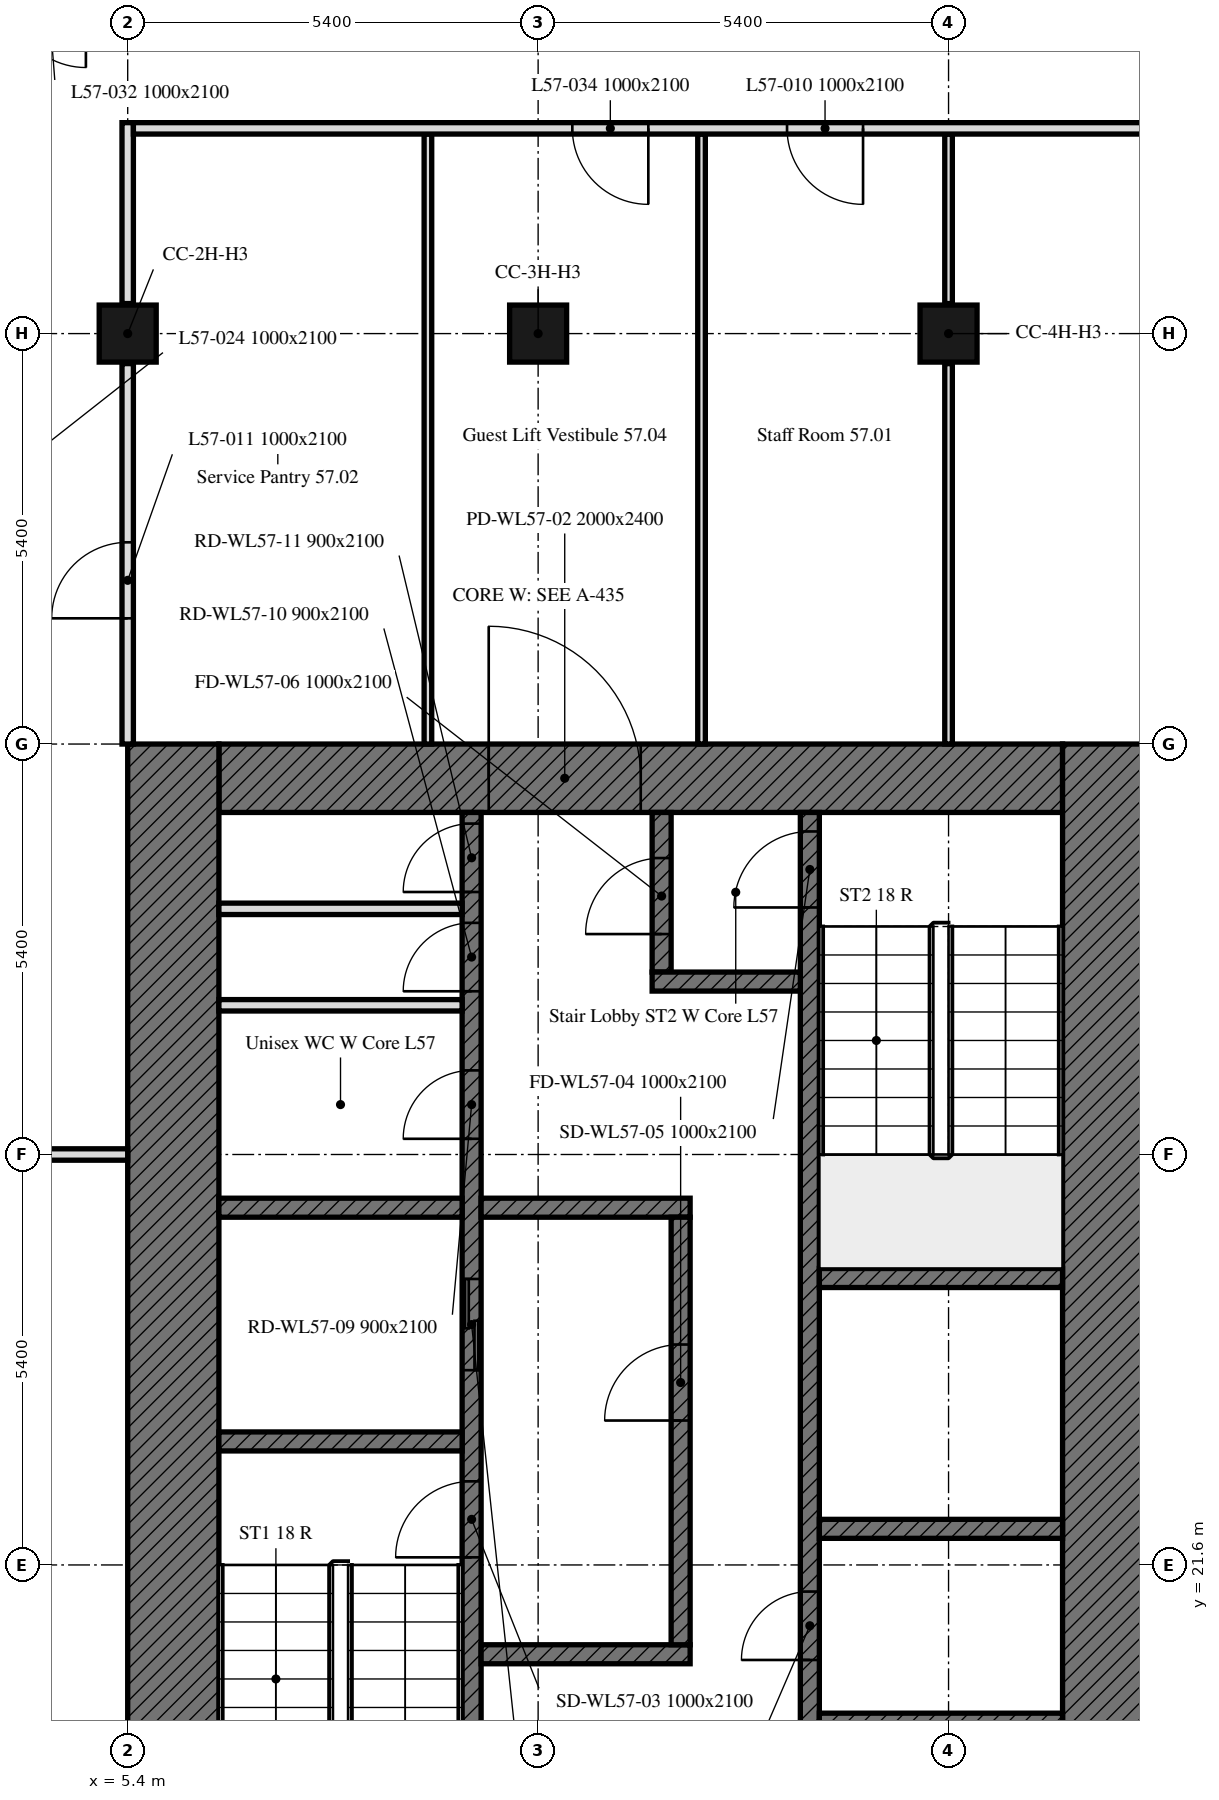
"""IFC4 building model, lengths in metres.
Left out: names, types, materials, properties, quantities, classifications, styles, units other than length and angle.
Written with IfcOpenShell. Run it as: python <this file> out.ifc"""

import sys

from ifc_helpers import new_model, si_unit, direction, frame, frame_2d, origin, origin_2d, place, context, subcontext, project, spatial, rectangle, extrude, element, fill, save


model = new_model("IFC4")
c1 = context("Model", 3, precision=1e-05, world=origin(), true_north=direction((0.0, 1.0)))
c2 = subcontext(c1, "Body", "Model", "MODEL_VIEW")
j1 = project(units=[si_unit("LENGTHUNIT", "METRE"), si_unit("PLANEANGLEUNIT", "RADIAN")], contexts=[c1])
p1 = place(None, origin())
s1 = spatial("IfcSite", under=j1, at=p1, CompositionType="ELEMENT")
p2 = place(p1, origin())
s2 = spatial("IfcBuilding", under=s1, at=p2, CompositionType="ELEMENT")
p3 = place(p2, frame((0.0, 0.0, 226.9)))
s3 = spatial("IfcBuildingStorey", under=s2, at=p3, CompositionType="ELEMENT", Elevation=226.9)
for number, where, z_axis, x_axis in (
    (1, (5.4, 37.8, 0.0), (0.0, 0.0, 1.0), (1.0, 0.0, 0.0)),
    (2, (10.8, 37.8, 0.0), (0.0, 0.0, 1.0), (1.0, 0.0, 0.0)),
    (3, (16.2, 37.8, 0.0), (0.0, 0.0, 1.0), (1.0, 0.0, 0.0)),
):
    element("IfcColumn", number, at=place(p3, frame(where, z_axis=z_axis, x_axis=x_axis)), inside=s3, PredefinedType="COLUMN", context=c2, shape_type="SweptSolid", body=[
        extrude(rectangle(XDim=0.75, YDim=0.75, at=origin_2d()), origin(), (0.0, 0.0, 1.0), 3.0),
    ])
p4 = place(p3, frame((6.6, 31.95, 0.0), z_axis=(0.0, 0.0, 1.0), x_axis=(1.0, 0.0, 0.0)))
e4 = element("IfcWall", 4, at=p4, inside=s3, PredefinedType="SOLIDWALL", context=c2, shape_type="SweptSolid", body=[
    extrude(rectangle(XDim=11.1, YDim=0.9, at=frame_2d((5.55, 0.0))), origin(), (0.0, 0.0, 1.0), 3.0),
])
p5 = place(p4, frame((3.55, 0.0, 0.0)))
e5 = element("IfcOpeningElement", 5, at=p5, cuts=e4, PredefinedType="OPENING", context=c2, shape_type="SweptSolid", body=[
    extrude(rectangle(XDim=2.0, YDim=2.4, at=frame_2d((1.0, 1.2))), frame((0.0, 0.45, 0.0), z_axis=(0.0, -1.0, 0.0), x_axis=(1.0, 0.0, 0.0)), (0.0, 0.0, 1.0), 0.9),
])
for number, where, z_axis, x_axis in (
    (6, (6.0, 16.2, 0.0), (0.0, 0.0, 1.0), (0.0, 1.0, 0.0)),
    (7, (18.3, 32.4, 0.0), (0.0, 0.0, 1.0), (0.0, -1.0, 0.0)),
):
    element("IfcWall", number, at=place(p3, frame(where, z_axis=z_axis, x_axis=x_axis)), inside=s3, PredefinedType="SOLIDWALL", context=c2, shape_type="SweptSolid", body=[
        extrude(rectangle(XDim=16.2, YDim=1.2, at=frame_2d((8.1, 0.0))), origin(), (0.0, 0.0, 1.0), 3.0),
    ])
p6 = place(p3, frame((9.925, 17.1, 0.0), z_axis=(0.0, 0.0, 1.0), x_axis=(0.0, 1.0, 0.0)))
e8 = element("IfcWall", 8, at=p6, inside=s3, PredefinedType="SOLIDWALL", context=c2, shape_type="SweptSolid", body=[
    extrude(rectangle(XDim=14.4, YDim=0.25, at=frame_2d((7.2, 0.0))), origin(), (0.0, 0.0, 1.0), 3.0),
])
p7 = place(p6, frame((4.6, 0.0, 0.0)))
e9 = element("IfcOpeningElement", 9, at=p7, cuts=e8, PredefinedType="OPENING", context=c2, shape_type="SweptSolid", body=[
    extrude(rectangle(XDim=1.0, YDim=2.1, at=frame_2d((0.5, 1.05))), frame((0.0, 0.125, 0.0), z_axis=(0.0, -1.0, 0.0), x_axis=(1.0, 0.0, 0.0)), (0.0, 0.0, 1.0), 0.25),
])
p8 = place(p6, frame((7.062, 0.0, 0.0)))
e10 = element("IfcOpeningElement", 10, at=p8, cuts=e8, PredefinedType="OPENING", context=c2, shape_type="SweptSolid", body=[
    extrude(rectangle(XDim=1.2, YDim=2.1, at=frame_2d((0.6, 1.05))), frame((0.0, 0.125, 0.0), z_axis=(0.0, -1.0, 0.0), x_axis=(1.0, 0.0, 0.0)), (0.0, 0.0, 1.0), 0.25),
])
p9 = place(p6, frame((10.106, 0.0, 0.0)))
e11 = element("IfcOpeningElement", 11, at=p9, cuts=e8, PredefinedType="OPENING", context=c2, shape_type="SweptSolid", body=[
    extrude(rectangle(XDim=0.9, YDim=2.1, at=frame_2d((0.45, 1.05))), frame((0.0, 0.125, 0.0), z_axis=(0.0, -1.0, 0.0), x_axis=(1.0, 0.0, 0.0)), (0.0, 0.0, 1.0), 0.25),
])
p10 = place(p6, frame((12.048, 0.0, 0.0)))
e12 = element("IfcOpeningElement", 12, at=p10, cuts=e8, PredefinedType="OPENING", context=c2, shape_type="SweptSolid", body=[
    extrude(rectangle(XDim=0.9, YDim=2.1, at=frame_2d((0.45, 1.05))), frame((0.0, 0.125, 0.0), z_axis=(0.0, -1.0, 0.0), x_axis=(1.0, 0.0, 0.0)), (0.0, 0.0, 1.0), 0.25),
])
p11 = place(p6, frame((13.354, 0.0, 0.0)))
e13 = element("IfcOpeningElement", 13, at=p11, cuts=e8, PredefinedType="OPENING", context=c2, shape_type="SweptSolid", body=[
    extrude(rectangle(XDim=0.9, YDim=2.1, at=frame_2d((0.45, 1.05))), frame((0.0, 0.125, 0.0), z_axis=(0.0, -1.0, 0.0), x_axis=(1.0, 0.0, 0.0)), (0.0, 0.0, 1.0), 0.25),
])
p12 = place(p3, frame((14.375, 17.1, 0.0), z_axis=(0.0, 0.0, 1.0), x_axis=(0.0, 1.0, 0.0)))
e14 = element("IfcWall", 14, at=p12, inside=s3, PredefinedType="SOLIDWALL", context=c2, shape_type="SweptSolid", body=[
    extrude(rectangle(XDim=14.4, YDim=0.25, at=frame_2d((7.2, 0.0))), origin(), (0.0, 0.0, 1.0), 3.0),
])
p13 = place(p12, frame((13.15, 0.0, 0.0)))
e15 = element("IfcOpeningElement", 15, at=p13, cuts=e14, PredefinedType="OPENING", context=c2, shape_type="SweptSolid", body=[
    extrude(rectangle(XDim=1.0, YDim=2.1, at=frame_2d((0.5, 1.05))), frame((0.0, 0.125, 0.0), z_axis=(0.0, -1.0, 0.0), x_axis=(1.0, 0.0, 0.0)), (0.0, 0.0, 1.0), 0.25),
])
p14 = place(p12, frame((0.6, 0.0, 0.0)))
e16 = element("IfcOpeningElement", 16, at=p14, cuts=e14, PredefinedType="OPENING", context=c2, shape_type="SweptSolid", body=[
    extrude(rectangle(XDim=1.1, YDim=2.1, at=frame_2d((0.55, 1.05))), frame((0.0, 0.125, 0.0), z_axis=(0.0, -1.0, 0.0), x_axis=(1.0, 0.0, 0.0)), (0.0, 0.0, 1.0), 0.25),
])
p15 = place(p12, frame((3.25, 0.0, 0.0)))
e17 = element("IfcOpeningElement", 17, at=p15, cuts=e14, PredefinedType="OPENING", context=c2, shape_type="SweptSolid", body=[
    extrude(rectangle(XDim=0.9, YDim=2.1, at=frame_2d((0.45, 1.05))), frame((0.0, 0.125, 0.0), z_axis=(0.0, -1.0, 0.0), x_axis=(1.0, 0.0, 0.0)), (0.0, 0.0, 1.0), 0.25),
])
for number, where, z_axis, x_axis in (
    (18, (6.6, 23.225, 0.0), (0.0, 0.0, 1.0), (1.0, 0.0, 0.0)),
    (19, (14.5, 25.375, 0.0), (0.0, 0.0, 1.0), (1.0, 0.0, 0.0)),
    (20, (14.5, 22.075, 0.0), (0.0, 0.0, 1.0), (1.0, 0.0, 0.0)),
    (21, (6.6, 26.3, 0.0), (0.0, 0.0, 1.0), (1.0, 0.0, 0.0)),
):
    element("IfcWall", number, at=place(p3, frame(where, z_axis=z_axis, x_axis=x_axis)), inside=s3, PredefinedType="SOLIDWALL", context=c2, shape_type="SweptSolid", body=[
        extrude(rectangle(XDim=3.2, YDim=0.25, at=frame_2d((1.6, 0.0))), origin(), (0.0, 0.0, 1.0), 3.0),
    ])
for number, where, z_axis, x_axis in (
    (22, (10.05, 26.3, 0.0), (0.0, 0.0, 1.0), (1.0, 0.0, 0.0)),
    (23, (10.05, 20.425, 0.0), (0.0, 0.0, 1.0), (1.0, 0.0, 0.0)),
):
    element("IfcWall", number, at=place(p3, frame(where, z_axis=z_axis, x_axis=x_axis)), inside=s3, PredefinedType="SOLIDWALL", context=c2, shape_type="SweptSolid", body=[
        extrude(rectangle(XDim=2.75, YDim=0.25, at=frame_2d((1.375, 0.0))), origin(), (0.0, 0.0, 1.0), 3.0),
    ])
p16 = place(p3, frame((12.425, 29.4, 0.0), z_axis=(0.0, 0.0, 1.0), x_axis=(0.0, 1.0, 0.0)))
e24 = element("IfcWall", 24, at=p16, inside=s3, PredefinedType="SOLIDWALL", context=c2, shape_type="SweptSolid", body=[
    extrude(rectangle(XDim=2.1, YDim=0.25, at=frame_2d((1.05, 0.0))), origin(), (0.0, 0.0, 1.0), 3.0),
])
p17 = place(p16, frame((0.5, 0.0, 0.0)))
e25 = element("IfcOpeningElement", 25, at=p17, cuts=e24, PredefinedType="OPENING", context=c2, shape_type="SweptSolid", body=[
    extrude(rectangle(XDim=1.0, YDim=2.1, at=frame_2d((0.5, 1.05))), frame((0.0, 0.125, 0.0), z_axis=(0.0, -1.0, 0.0), x_axis=(1.0, 0.0, 0.0)), (0.0, 0.0, 1.0), 0.25),
])
p18 = place(p3, frame((12.3, 29.275, 0.0), z_axis=(0.0, 0.0, 1.0), x_axis=(1.0, 0.0, 0.0)))
e26 = element("IfcWall", 26, at=p18, inside=s3, PredefinedType="SOLIDWALL", context=c2, shape_type="SweptSolid", body=[
    extrude(rectangle(XDim=1.95, YDim=0.25, at=frame_2d((0.975, 0.0))), origin(), (0.0, 0.0, 1.0), 3.0),
])
p19 = place(p3, frame((12.675, 20.55, 0.0), z_axis=(0.0, 0.0, 1.0), x_axis=(0.0, 1.0, 0.0)))
e27 = element("IfcWall", 27, at=p19, inside=s3, PredefinedType="SOLIDWALL", context=c2, shape_type="SweptSolid", body=[
    extrude(rectangle(XDim=5.625, YDim=0.25, at=frame_2d((2.812, 0.0))), origin(), (0.0, 0.0, 1.0), 3.0),
])
p20 = place(p19, frame((2.95, 0.0, 0.0)))
e28 = element("IfcOpeningElement", 28, at=p20, cuts=e27, PredefinedType="OPENING", context=c2, shape_type="SweptSolid", body=[
    extrude(rectangle(XDim=1.0, YDim=2.1, at=frame_2d((0.5, 1.05))), frame((0.0, 0.125, 0.0), z_axis=(0.0, -1.0, 0.0), x_axis=(1.0, 0.0, 0.0)), (0.0, 0.0, 1.0), 0.25),
])
p21 = place(p3, frame((14.5, 19.525, 0.0), z_axis=(0.0, 0.0, 1.0), x_axis=(1.0, 0.0, 0.0)))
e29 = element("IfcWall", 29, at=p21, inside=s3, PredefinedType="SOLIDWALL", context=c2, shape_type="SweptSolid", body=[
    extrude(rectangle(XDim=3.2, YDim=0.25, at=frame_2d((1.6, 0.0))), origin(), (0.0, 0.0, 1.0), 3.0),
])
for number, where, z_axis, x_axis in (
    (30, (6.6, 28.963, 0.0), (0.0, 0.0, 1.0), (1.0, 0.0, 0.0)),
    (31, (6.6, 30.232, 0.0), (0.0, 0.0, 1.0), (1.0, 0.0, 0.0)),
):
    element("IfcWall", number, at=place(p3, frame(where, z_axis=z_axis, x_axis=x_axis)), inside=s3, PredefinedType="PARTITIONING", context=c2, shape_type="SweptSolid", body=[
        extrude(rectangle(XDim=3.2, YDim=0.15, at=frame_2d((1.6, 0.0))), origin(), (0.0, 0.0, 1.0), 3.0),
    ])
p22 = place(p3, frame((16.2, 40.425, 0.0), z_axis=(0.0, 0.0, 1.0), x_axis=(0.0, -1.0, 0.0)))
e32 = element("IfcWall", 32, at=p22, inside=s3, PredefinedType="PARTITIONING", context=c2, shape_type="SweptSolid", body=[
    extrude(rectangle(XDim=2.23, YDim=0.1, at=frame_2d((1.115, 0.0))), origin(), (0.0, 0.0, 1.0), 2.4),
])
p23 = place(p3, frame((16.2, 37.405, 0.0), z_axis=(0.0, 0.0, 1.0), x_axis=(0.0, -1.0, 0.0)))
e33 = element("IfcWall", 33, at=p23, inside=s3, PredefinedType="PARTITIONING", context=c2, shape_type="SweptSolid", body=[
    extrude(rectangle(XDim=5.005, YDim=0.1, at=frame_2d((2.502, 0.0))), origin(), (0.0, 0.0, 1.0), 2.4),
])
for number, where, z_axis, x_axis in (
    (34, (12.95, 32.4, 0.0), (0.0, 0.0, 1.0), (0.0, 1.0, 0.0)),
    (35, (9.35, 40.425, 0.0), (0.0, 0.0, 1.0), (0.0, -1.0, 0.0)),
):
    element("IfcWall", number, at=place(p3, frame(where, z_axis=z_axis, x_axis=x_axis)), inside=s3, PredefinedType="PARTITIONING", context=c2, shape_type="SweptSolid", body=[
        extrude(rectangle(XDim=8.025, YDim=0.1, at=frame_2d((4.013, 0.0))), origin(), (0.0, 0.0, 1.0), 2.4),
    ])
p24 = place(p3, frame((3.375, 27.0, 0.0), z_axis=(0.0, 0.0, 1.0), x_axis=(1.0, 0.0, 0.0)))
e36 = element("IfcWall", 36, at=p24, inside=s3, PredefinedType="PARTITIONING", context=c2, shape_type="SweptSolid", body=[
    extrude(rectangle(XDim=2.025, YDim=0.15, at=frame_2d((1.012, 0.0))), origin(), (0.0, 0.0, 1.0), 2.4),
])
p25 = place(p3, frame((5.4, 32.4, 0.0), z_axis=(0.0, 0.0, 1.0), x_axis=(0.0, 1.0, 0.0)))
e37 = element("IfcWall", 37, at=p25, inside=s3, PredefinedType="PARTITIONING", context=c2, shape_type="SweptSolid", body=[
    extrude(rectangle(XDim=5.005, YDim=0.15, at=frame_2d((2.502, 0.0))), origin(), (0.0, 0.0, 1.0), 3.0),
])
p26 = place(p25, frame((1.654, 0.0, 0.0)))
e38 = element("IfcOpeningElement", 38, at=p26, cuts=e37, PredefinedType="OPENING", context=c2, shape_type="SweptSolid", body=[
    extrude(rectangle(XDim=1.0, YDim=2.1, at=frame_2d((0.5, 1.05))), frame((0.0, 0.075, 0.0), z_axis=(0.0, -1.0, 0.0), x_axis=(1.0, 0.0, 0.0)), (0.0, 0.0, 1.0), 0.15),
])
p27 = place(p3, frame((5.4, 38.195, 0.0), z_axis=(0.0, 0.0, 1.0), x_axis=(0.0, 1.0, 0.0)))
e39 = element("IfcWall", 39, at=p27, inside=s3, PredefinedType="PARTITIONING", context=c2, shape_type="SweptSolid", body=[
    extrude(rectangle(XDim=2.38, YDim=0.15, at=frame_2d((1.19, 0.0))), origin(), (0.0, 0.0, 1.0), 3.0),
])
p28 = place(p3, frame((42.449, 40.5, 0.0), z_axis=(0.0, 0.0, 1.0), x_axis=(-1.0, 0.0, 0.0)))
e40 = element("IfcWall", 40, at=p28, inside=s3, PredefinedType="PARTITIONING", context=c2, shape_type="SweptSolid", body=[
    extrude(rectangle(XDim=36.974, YDim=0.15, at=frame_2d((18.487, 0.0))), origin(), (0.0, 0.0, 1.0), 2.4),
])
p29 = place(p28, frame((17.649, 0.0, 0.0)))
e41 = element("IfcOpeningElement", 41, at=p29, cuts=e40, PredefinedType="OPENING", context=c2, shape_type="SweptSolid", body=[
    extrude(rectangle(XDim=1.0, YDim=2.1, at=frame_2d((0.5, 1.05))), frame((0.0, 0.075, 0.0), z_axis=(0.0, -1.0, 0.0), x_axis=(1.0, 0.0, 0.0)), (0.0, 0.0, 1.0), 0.15),
])
p30 = place(p28, frame((2.029, 0.0, 0.0)))
e42 = element("IfcOpeningElement", 42, at=p30, cuts=e40, PredefinedType="OPENING", context=c2, shape_type="SweptSolid", body=[
    extrude(rectangle(XDim=1.0, YDim=2.1, at=frame_2d((0.5, 1.05))), frame((0.0, 0.075, 0.0), z_axis=(0.0, -1.0, 0.0), x_axis=(1.0, 0.0, 0.0)), (0.0, 0.0, 1.0), 0.15),
])
p31 = place(p28, frame((27.374, 0.0, 0.0)))
e43 = element("IfcOpeningElement", 43, at=p31, cuts=e40, PredefinedType="OPENING", context=c2, shape_type="SweptSolid", body=[
    extrude(rectangle(XDim=1.0, YDim=2.1, at=frame_2d((0.5, 1.05))), frame((0.0, 0.075, 0.0), z_axis=(0.0, -1.0, 0.0), x_axis=(1.0, 0.0, 0.0)), (0.0, 0.0, 1.0), 0.15),
])
p32 = place(p28, frame((7.924, 0.0, 0.0)))
e44 = element("IfcOpeningElement", 44, at=p32, cuts=e40, PredefinedType="OPENING", context=c2, shape_type="SweptSolid", body=[
    extrude(rectangle(XDim=1.0, YDim=2.1, at=frame_2d((0.5, 1.05))), frame((0.0, 0.075, 0.0), z_axis=(0.0, -1.0, 0.0), x_axis=(1.0, 0.0, 0.0)), (0.0, 0.0, 1.0), 0.15),
])
p33 = place(p28, frame((4.699, 0.0, 0.0)))
e45 = element("IfcOpeningElement", 45, at=p33, cuts=e40, PredefinedType="OPENING", context=c2, shape_type="SweptSolid", body=[
    extrude(rectangle(XDim=1.8, YDim=2.4, at=frame_2d((0.9, 1.2))), frame((0.0, 0.075, 0.0), z_axis=(0.0, -1.0, 0.0), x_axis=(1.0, 0.0, 0.0)), (0.0, 0.0, 1.0), 0.15),
])
p34 = place(p28, frame((30.199, 0.0, 0.0)))
e46 = element("IfcOpeningElement", 46, at=p34, cuts=e40, PredefinedType="OPENING", context=c2, shape_type="SweptSolid", body=[
    extrude(rectangle(XDim=1.0, YDim=2.1, at=frame_2d((0.5, 1.05))), frame((0.0, 0.075, 0.0), z_axis=(0.0, -1.0, 0.0), x_axis=(1.0, 0.0, 0.0)), (0.0, 0.0, 1.0), 0.15),
])
p35 = place(p5, origin())
e47 = element("IfcDoor", 47, at=p35, inside=s3, OperationType="DOUBLE_DOOR_SINGLE_SWING", PredefinedType="DOOR", context=c2, shape_type="SweptSolid", body=[
    extrude(rectangle(XDim=2.0, YDim=2.4, at=frame_2d((1.0, 1.2))), frame((0.0, 0.025, 0.0), z_axis=(0.0, -1.0, 0.0), x_axis=(1.0, 0.0, 0.0)), (0.0, 0.0, 1.0), 0.05),
])
fill(e5, e47)
p36 = place(p7, origin())
e48 = element("IfcDoor", 48, at=p36, inside=s3, OperationType="SINGLE_SWING_LEFT", PredefinedType="DOOR", context=c2, shape_type="SweptSolid", body=[
    extrude(rectangle(XDim=1.0, YDim=2.1, at=frame_2d((0.5, 1.05))), frame((0.0, 0.025, 0.0), z_axis=(0.0, -1.0, 0.0), x_axis=(1.0, 0.0, 0.0)), (0.0, 0.0, 1.0), 0.05),
])
fill(e9, e48)
p37 = place(p20, origin())
e49 = element("IfcDoor", 49, at=p37, inside=s3, OperationType="SINGLE_SWING_LEFT", PredefinedType="DOOR", context=c2, shape_type="SweptSolid", body=[
    extrude(rectangle(XDim=1.0, YDim=2.1, at=frame_2d((0.5, 1.05))), frame((0.0, 0.025, 0.0), z_axis=(0.0, -1.0, 0.0), x_axis=(1.0, 0.0, 0.0)), (0.0, 0.0, 1.0), 0.05),
])
fill(e28, e49)
p38 = place(p13, origin())
e50 = element("IfcDoor", 50, at=p38, inside=s3, OperationType="SINGLE_SWING_LEFT", PredefinedType="DOOR", context=c2, shape_type="SweptSolid", body=[
    extrude(rectangle(XDim=1.0, YDim=2.1, at=frame_2d((0.5, 1.05))), frame((0.0, 0.025, 0.0), z_axis=(0.0, -1.0, 0.0), x_axis=(1.0, 0.0, 0.0)), (0.0, 0.0, 1.0), 0.05),
])
fill(e15, e50)
p39 = place(p17, origin())
e51 = element("IfcDoor", 51, at=p39, inside=s3, OperationType="SINGLE_SWING_LEFT", PredefinedType="DOOR", context=c2, shape_type="SweptSolid", body=[
    extrude(rectangle(XDim=1.0, YDim=2.1, at=frame_2d((0.5, 1.05))), frame((0.0, 0.025, 0.0), z_axis=(0.0, -1.0, 0.0), x_axis=(1.0, 0.0, 0.0)), (0.0, 0.0, 1.0), 0.05),
])
fill(e25, e51)
p40 = place(p8, origin())
e52 = element("IfcDoor", 52, at=p40, inside=s3, OperationType="DOUBLE_DOOR_SLIDING", PredefinedType="DOOR", context=c2, shape_type="SweptSolid", body=[
    extrude(rectangle(XDim=1.2, YDim=2.1, at=frame_2d((0.6, 1.05))), frame((0.0, 0.025, 0.0), z_axis=(0.0, -1.0, 0.0), x_axis=(1.0, 0.0, 0.0)), (0.0, 0.0, 1.0), 0.05),
])
fill(e10, e52)
p41 = place(p9, origin())
e53 = element("IfcDoor", 53, at=p41, inside=s3, OperationType="SINGLE_SWING_LEFT", PredefinedType="DOOR", context=c2, shape_type="SweptSolid", body=[
    extrude(rectangle(XDim=0.9, YDim=2.1, at=frame_2d((0.45, 1.05))), frame((0.0, 0.025, 0.0), z_axis=(0.0, -1.0, 0.0), x_axis=(1.0, 0.0, 0.0)), (0.0, 0.0, 1.0), 0.05),
])
fill(e11, e53)
p42 = place(p10, origin())
e54 = element("IfcDoor", 54, at=p42, inside=s3, OperationType="SINGLE_SWING_LEFT", PredefinedType="DOOR", context=c2, shape_type="SweptSolid", body=[
    extrude(rectangle(XDim=0.9, YDim=2.1, at=frame_2d((0.45, 1.05))), frame((0.0, 0.025, 0.0), z_axis=(0.0, -1.0, 0.0), x_axis=(1.0, 0.0, 0.0)), (0.0, 0.0, 1.0), 0.05),
])
fill(e12, e54)
p43 = place(p11, origin())
e55 = element("IfcDoor", 55, at=p43, inside=s3, OperationType="SINGLE_SWING_LEFT", PredefinedType="DOOR", context=c2, shape_type="SweptSolid", body=[
    extrude(rectangle(XDim=0.9, YDim=2.1, at=frame_2d((0.45, 1.05))), frame((0.0, 0.025, 0.0), z_axis=(0.0, -1.0, 0.0), x_axis=(1.0, 0.0, 0.0)), (0.0, 0.0, 1.0), 0.05),
])
fill(e13, e55)
p44 = place(p15, origin())
e56 = element("IfcDoor", 56, at=p44, inside=s3, OperationType="SINGLE_SWING_LEFT", PredefinedType="DOOR", context=c2, shape_type="SweptSolid", body=[
    extrude(rectangle(XDim=0.9, YDim=2.1, at=frame_2d((0.45, 1.05))), frame((0.0, 0.025, 0.0), z_axis=(0.0, -1.0, 0.0), x_axis=(1.0, 0.0, 0.0)), (0.0, 0.0, 1.0), 0.05),
])
fill(e17, e56)
p45 = place(p31, origin())
e57 = element("IfcDoor", 57, at=p45, inside=s3, OperationType="SINGLE_SWING_RIGHT", PredefinedType="DOOR", context=c2, shape_type="SweptSolid", body=[
    extrude(rectangle(XDim=1.0, YDim=2.1, at=frame_2d((0.5, 1.05))), frame((0.0, 0.025, 0.0), z_axis=(0.0, -1.0, 0.0), x_axis=(1.0, 0.0, 0.0)), (0.0, 0.0, 1.0), 0.05),
])
fill(e43, e57)
p46 = place(p26, origin())
e58 = element("IfcDoor", 58, at=p46, inside=s3, OperationType="SINGLE_SWING_LEFT", PredefinedType="DOOR", context=c2, shape_type="SweptSolid", body=[
    extrude(rectangle(XDim=1.0, YDim=2.1, at=frame_2d((0.5, 1.05))), frame((0.0, 0.025, 0.0), z_axis=(0.0, -1.0, 0.0), x_axis=(1.0, 0.0, 0.0)), (0.0, 0.0, 1.0), 0.05),
])
fill(e38, e58)
p47 = place(p34, origin())
e59 = element("IfcDoor", 59, at=p47, inside=s3, OperationType="SINGLE_SWING_LEFT", PredefinedType="DOOR", context=c2, shape_type="SweptSolid", body=[
    extrude(rectangle(XDim=1.0, YDim=2.1, at=frame_2d((0.5, 1.05))), frame((0.0, 0.025, 0.0), z_axis=(0.0, -1.0, 0.0), x_axis=(1.0, 0.0, 0.0)), (0.0, 0.0, 1.0), 0.05),
])
fill(e46, e59)
save(model, sys.argv[1])
